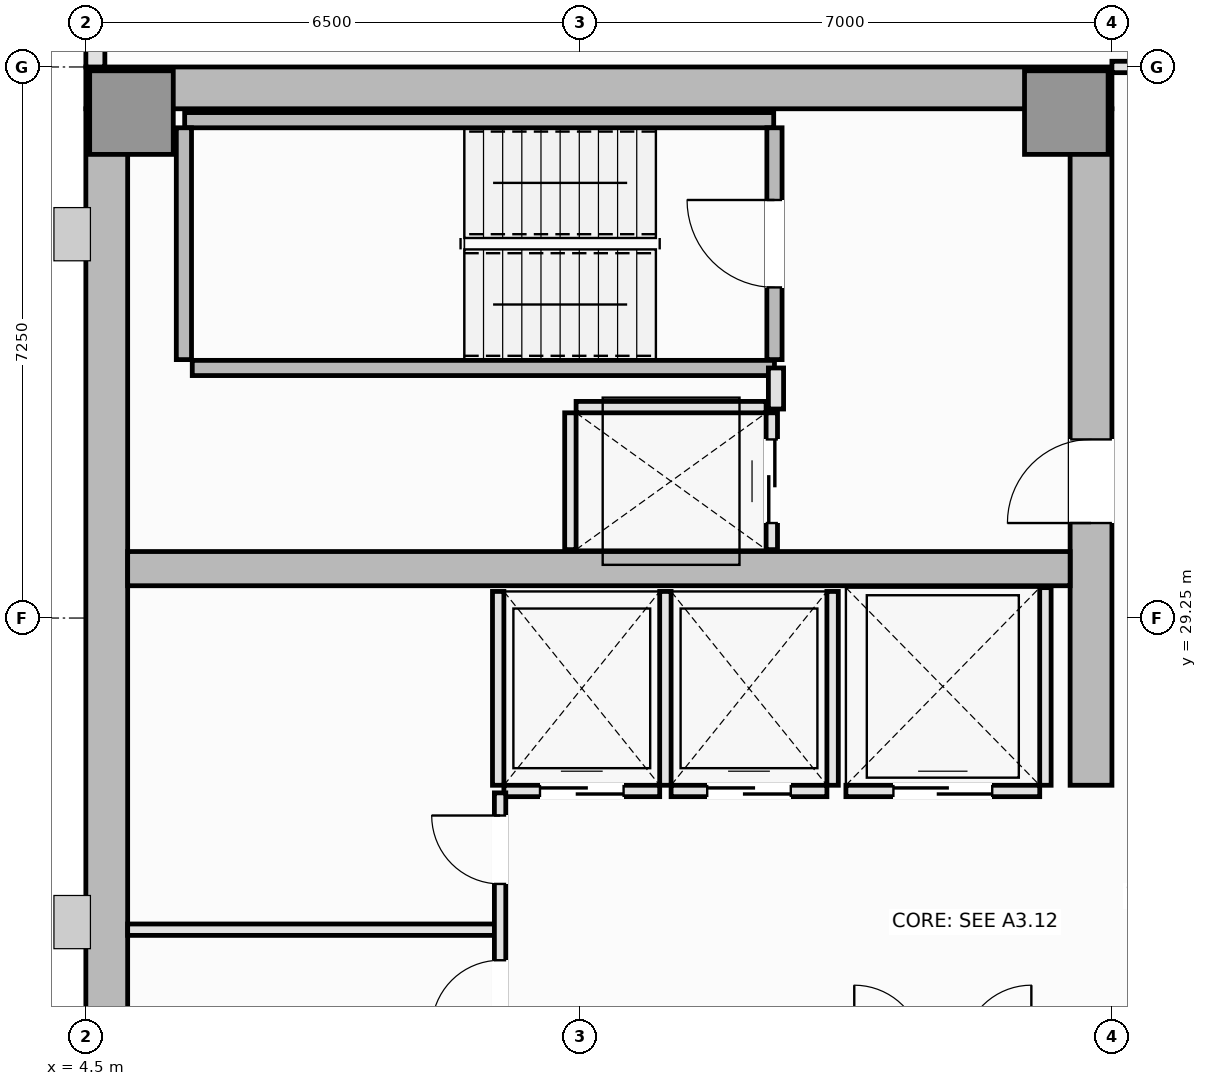
"""IFC4 building model, lengths in metres.
Left out: names, types, materials, properties, quantities, classifications, styles, units other than length and angle.
Written with IfcOpenShell. Run it as: python <this file> out.ifc"""

import sys

from ifc_helpers import new_model, si_unit, direction, frame, frame_2d, origin, origin_2d, place, context, subcontext, project, spatial, rectangle, extrude, element, fill, save


model = new_model("IFC4")
c1 = context("Model", 3, precision=1e-05, world=origin(), true_north=direction((0.0, 1.0)))
c2 = subcontext(c1, "Body", "Model", "MODEL_VIEW")
j1 = project(units=[si_unit("LENGTHUNIT", "METRE"), si_unit("PLANEANGLEUNIT", "RADIAN")], contexts=[c1])
p1 = place(None, origin())
s1 = spatial("IfcSite", under=j1, at=p1, CompositionType="ELEMENT")
p2 = place(p1, origin())
s2 = spatial("IfcBuilding", under=s1, at=p2, CompositionType="ELEMENT")
p3 = place(p2, frame((0.0, 0.0, 202.25)))
s3 = spatial("IfcBuildingStorey", under=s2, at=p3, CompositionType="ELEMENT", Elevation=202.25)
p4 = place(p3, frame((4.5, 36.225, 0.0), z_axis=(0.0, 0.0, 1.0), x_axis=(1.0, 0.0, 0.0)))
e1 = element("IfcWall", 1, at=p4, inside=s3, PredefinedType="SHEAR", context=c2, shape_type="SweptSolid", body=[
    extrude(rectangle(XDim=13.5, YDim=0.55, at=frame_2d((6.75, 0.0))), origin(), (0.0, 0.0, 1.0), 3.55),
])
p5 = place(p3, frame((4.775, 14.55, 0.0), z_axis=(0.0, 0.0, 1.0), x_axis=(0.0, 1.0, 0.0)))
e2 = element("IfcWall", 2, at=p5, inside=s3, PredefinedType="SHEAR", context=c2, shape_type="SweptSolid", body=[
    extrude(rectangle(XDim=21.4, YDim=0.55, at=frame_2d((10.7, 0.0))), origin(), (0.0, 0.0, 1.0), 3.55),
])
p6 = place(p3, frame((17.725, 27.05, 0.0), z_axis=(0.0, 0.0, 1.0), x_axis=(0.0, 1.0, 0.0)))
e3 = element("IfcWall", 3, at=p6, inside=s3, PredefinedType="SHEAR", context=c2, shape_type="SweptSolid", body=[
    extrude(rectangle(XDim=8.9, YDim=0.55, at=frame_2d((4.45, 0.0))), origin(), (0.0, 0.0, 1.0), 3.55),
])
p7 = place(p6, frame((3.45, 0.0, 0.0)))
e4 = element("IfcOpeningElement", 4, at=p7, cuts=e3, PredefinedType="OPENING", context=c2, shape_type="SweptSolid", body=[
    extrude(rectangle(XDim=1.1, YDim=2.15, at=frame_2d((0.55, 1.075))), frame((0.0, 0.285, 0.0), z_axis=(0.0, -1.0, 0.0), x_axis=(1.0, 0.0, 0.0)), (0.0, 0.0, 1.0), 0.57),
])
p8 = place(p3, frame((5.05, 29.9, 0.0), z_axis=(0.0, 0.0, 1.0), x_axis=(1.0, 0.0, 0.0)))
e5 = element("IfcWall", 5, at=p8, inside=s3, PredefinedType="SHEAR", context=c2, shape_type="SweptSolid", body=[
    extrude(rectangle(XDim=12.4, YDim=0.45, at=frame_2d((6.2, 0.0))), origin(), (0.0, 0.0, 1.0), 3.55),
])
for number, where, z_axis, x_axis in (
    (6, (5.1, 35.9, 0.0), (0.0, 0.0, 1.0), (1.0, 0.0, 0.0)),
    (7, (17.4, 35.9, 0.0), (0.0, 0.0, 1.0), (1.0, 0.0, 0.0)),
):
    element("IfcColumn", number, at=place(p3, frame(where, z_axis=z_axis, x_axis=x_axis)), inside=s3, PredefinedType="PILASTER", context=c2, shape_type="SweptSolid", body=[
        extrude(rectangle(XDim=1.1, YDim=1.1, at=origin_2d()), origin(), (0.0, 0.0, 1.0), 3.55),
    ])
p9 = place(p3, frame((4.625, 40.5, 0.0), z_axis=(0.0, 0.0, 1.0), x_axis=(0.0, -1.0, 0.0)))
e8 = element("IfcWall", 8, at=p9, inside=s3, PredefinedType="SOLIDWALL", context=c2, shape_type="SweptSolid", body=[
    extrude(rectangle(XDim=4.0, YDim=0.25, at=frame_2d((2.0, 0.0))), origin(), (0.0, 0.0, 1.0), 3.37),
])
p10 = place(p9, frame((0.9, 0.0, 0.9)))
e9 = element("IfcOpeningElement", 9, at=p10, cuts=e8, PredefinedType="OPENING", context=c2, shape_type="SweptSolid", body=[
    extrude(rectangle(XDim=2.2, YDim=1.8, at=frame_2d((1.1, 0.9))), frame((0.0, 0.135, 0.0), z_axis=(0.0, -1.0, 0.0), x_axis=(1.0, 0.0, 0.0)), (0.0, 0.0, 1.0), 0.27),
])
p11 = place(p3, frame((5.8, 35.8, 0.0), z_axis=(0.0, 0.0, 1.0), x_axis=(1.0, 0.0, 0.0)))
e10 = element("IfcWall", 10, at=p11, inside=s3, PredefinedType="SOLIDWALL", context=c2, shape_type="SweptSolid", body=[
    extrude(rectangle(XDim=7.75, YDim=0.2, at=frame_2d((3.875, 0.0))), origin(), (0.0, 0.0, 1.0), 3.55),
])
p12 = place(p3, frame((5.79, 32.65, 0.0), z_axis=(0.0, 0.0, 1.0), x_axis=(0.0, 1.0, 0.0)))
e11 = element("IfcWall", 11, at=p12, inside=s3, PredefinedType="SOLIDWALL", context=c2, shape_type="SweptSolid", body=[
    extrude(rectangle(XDim=3.05, YDim=0.2, at=frame_2d((1.525, 0.0))), origin(), (0.0, 0.0, 1.0), 3.55),
])
p13 = place(p3, frame((5.9, 32.54, 0.0), z_axis=(0.0, 0.0, 1.0), x_axis=(1.0, 0.0, 0.0)))
e12 = element("IfcWall", 12, at=p13, inside=s3, PredefinedType="SOLIDWALL", context=c2, shape_type="SweptSolid", body=[
    extrude(rectangle(XDim=7.66, YDim=0.2, at=frame_2d((3.83, 0.0))), origin(), (0.0, 0.0, 1.0), 3.55),
])
p14 = place(p3, frame((13.56, 32.65, 0.0), z_axis=(0.0, 0.0, 1.0), x_axis=(0.0, 1.0, 0.0)))
e13 = element("IfcWall", 13, at=p14, inside=s3, PredefinedType="SOLIDWALL", context=c2, shape_type="SweptSolid", body=[
    extrude(rectangle(XDim=3.05, YDim=0.2, at=frame_2d((1.525, 0.0))), origin(), (0.0, 0.0, 1.0), 3.55),
])
p15 = place(p14, frame((0.95, 0.0, 0.0)))
e14 = element("IfcOpeningElement", 14, at=p15, cuts=e13, PredefinedType="OPENING", context=c2, shape_type="SweptSolid", body=[
    extrude(rectangle(XDim=1.15, YDim=2.15, at=frame_2d((0.575, 1.075))), frame((0.0, 0.11, 0.0), z_axis=(0.0, -1.0, 0.0), x_axis=(1.0, 0.0, 0.0)), (0.0, 0.0, 1.0), 0.22),
])
p16 = place(p3, frame((10.0, 26.975, 0.0), z_axis=(0.0, 0.0, 1.0), x_axis=(1.0, 0.0, 0.0)))
e15 = element("IfcWall", 15, at=p16, inside=s3, PredefinedType="PARTITIONING", context=c2, shape_type="SweptSolid", body=[
    extrude(rectangle(XDim=2.05, YDim=0.15, at=frame_2d((1.025, 0.0))), origin(), (0.0, 0.0, 1.0), 3.37),
])
p17 = place(p16, frame((0.475, 0.0, 0.0)))
e16 = element("IfcOpeningElement", 16, at=p17, cuts=e15, PredefinedType="OPENING", context=c2, shape_type="SweptSolid", body=[
    extrude(rectangle(XDim=1.1, YDim=2.2, at=frame_2d((0.55, 1.1))), frame((0.0, 0.085, 0.0), z_axis=(0.0, -1.0, 0.0), x_axis=(1.0, 0.0, 0.0)), (0.0, 0.0, 1.0), 0.17),
])
for number, where, z_axis, x_axis in (
    (17, (9.925, 27.05, 0.0), (0.0, 0.0, 1.0), (0.0, 1.0, 0.0)),
    (18, (12.125, 27.05, 0.0), (0.0, 0.0, 1.0), (0.0, 1.0, 0.0)),
):
    element("IfcWall", number, at=place(p3, frame(where, z_axis=z_axis, x_axis=x_axis)), inside=s3, PredefinedType="PARTITIONING", context=c2, shape_type="SweptSolid", body=[
        extrude(rectangle(XDim=2.55, YDim=0.15, at=frame_2d((1.275, 0.0))), origin(), (0.0, 0.0, 1.0), 3.37),
    ])
p18 = place(p3, frame((12.2, 26.975, 0.0), z_axis=(0.0, 0.0, 1.0), x_axis=(1.0, 0.0, 0.0)))
e19 = element("IfcWall", 19, at=p18, inside=s3, PredefinedType="PARTITIONING", context=c2, shape_type="SweptSolid", body=[
    extrude(rectangle(XDim=2.05, YDim=0.15, at=frame_2d((1.025, 0.0))), origin(), (0.0, 0.0, 1.0), 3.37),
])
p19 = place(p18, frame((0.475, 0.0, 0.0)))
e20 = element("IfcOpeningElement", 20, at=p19, cuts=e19, PredefinedType="OPENING", context=c2, shape_type="SweptSolid", body=[
    extrude(rectangle(XDim=1.1, YDim=2.2, at=frame_2d((0.55, 1.1))), frame((0.0, 0.085, 0.0), z_axis=(0.0, -1.0, 0.0), x_axis=(1.0, 0.0, 0.0)), (0.0, 0.0, 1.0), 0.17),
])
p20 = place(p3, frame((14.325, 27.05, 0.0), z_axis=(0.0, 0.0, 1.0), x_axis=(0.0, 1.0, 0.0)))
e21 = element("IfcWall", 21, at=p20, inside=s3, PredefinedType="PARTITIONING", context=c2, shape_type="SweptSolid", body=[
    extrude(rectangle(XDim=2.55, YDim=0.15, at=frame_2d((1.275, 0.0))), origin(), (0.0, 0.0, 1.0), 3.37),
])
p21 = place(p3, frame((14.5, 26.975, 0.0), z_axis=(0.0, 0.0, 1.0), x_axis=(1.0, 0.0, 0.0)))
e22 = element("IfcWall", 22, at=p21, inside=s3, PredefinedType="PARTITIONING", context=c2, shape_type="SweptSolid", body=[
    extrude(rectangle(XDim=2.55, YDim=0.15, at=frame_2d((1.275, 0.0))), origin(), (0.0, 0.0, 1.0), 3.37),
])
p22 = place(p21, frame((0.625, 0.0, 0.0)))
e23 = element("IfcOpeningElement", 23, at=p22, cuts=e22, PredefinedType="OPENING", context=c2, shape_type="SweptSolid", body=[
    extrude(rectangle(XDim=1.3, YDim=2.2, at=frame_2d((0.65, 1.1))), frame((0.0, 0.085, 0.0), z_axis=(0.0, -1.0, 0.0), x_axis=(1.0, 0.0, 0.0)), (0.0, 0.0, 1.0), 0.17),
])
p23 = place(p3, frame((17.125, 27.05, 0.0), z_axis=(0.0, 0.0, 1.0), x_axis=(0.0, 1.0, 0.0)))
e24 = element("IfcWall", 24, at=p23, inside=s3, PredefinedType="PARTITIONING", context=c2, shape_type="SweptSolid", body=[
    extrude(rectangle(XDim=2.6, YDim=0.15, at=frame_2d((1.3, 0.0))), origin(), (0.0, 0.0, 1.0), 3.37),
])
p24 = place(p3, frame((10.95, 32.025, 0.0), z_axis=(0.0, 0.0, 1.0), x_axis=(1.0, 0.0, 0.0)))
e25 = element("IfcWall", 25, at=p24, inside=s3, PredefinedType="PARTITIONING", context=c2, shape_type="SweptSolid", body=[
    extrude(rectangle(XDim=2.5, YDim=0.15, at=frame_2d((1.25, 0.0))), origin(), (0.0, 0.0, 1.0), 3.37),
])
p25 = place(p3, frame((10.875, 30.15, 0.0), z_axis=(0.0, 0.0, 1.0), x_axis=(0.0, 1.0, 0.0)))
e26 = element("IfcWall", 26, at=p25, inside=s3, PredefinedType="PARTITIONING", context=c2, shape_type="SweptSolid", body=[
    extrude(rectangle(XDim=1.8, YDim=0.15, at=frame_2d((0.9, 0.0))), origin(), (0.0, 0.0, 1.0), 3.37),
])
p26 = place(p3, frame((13.525, 30.15, 0.0), z_axis=(0.0, 0.0, 1.0), x_axis=(0.0, 1.0, 0.0)))
e27 = element("IfcWall", 27, at=p26, inside=s3, PredefinedType="PARTITIONING", context=c2, shape_type="SweptSolid", body=[
    extrude(rectangle(XDim=1.8, YDim=0.15, at=frame_2d((0.9, 0.0))), origin(), (0.0, 0.0, 1.0), 3.37),
])
p27 = place(p26, frame((0.35, 0.0, 0.0)))
e28 = element("IfcOpeningElement", 28, at=p27, cuts=e27, PredefinedType="OPENING", context=c2, shape_type="SweptSolid", body=[
    extrude(rectangle(XDim=1.1, YDim=2.2, at=frame_2d((0.55, 1.1))), frame((0.0, 0.085, 0.0), z_axis=(0.0, -1.0, 0.0), x_axis=(1.0, 0.0, 0.0)), (0.0, 0.0, 1.0), 0.17),
])
p28 = place(p3, frame((13.58, 32.0, 0.0), z_axis=(0.0, 0.0, 1.0), x_axis=(0.0, 1.0, 0.0)))
e29 = element("IfcWall", 29, at=p28, inside=s3, PredefinedType="PARTITIONING", context=c2, shape_type="SweptSolid", body=[
    extrude(rectangle(XDim=0.54, YDim=0.2, at=frame_2d((0.27, 0.0))), origin(), (0.0, 0.0, 1.0), 3.37),
])
p29 = place(p3, frame((5.05, 25.15, 0.0), z_axis=(0.0, 0.0, 1.0), x_axis=(1.0, 0.0, 0.0)))
e30 = element("IfcWall", 30, at=p29, inside=s3, PredefinedType="PARTITIONING", context=c2, shape_type="SweptSolid", body=[
    extrude(rectangle(XDim=4.9, YDim=0.15, at=frame_2d((2.45, 0.0))), origin(), (0.0, 0.0, 1.0), 3.37),
])
p30 = place(p3, frame((9.95, 23.55, 0.0), z_axis=(0.0, 0.0, 1.0), x_axis=(0.0, 1.0, 0.0)))
e31 = element("IfcWall", 31, at=p30, inside=s3, PredefinedType="PARTITIONING", context=c2, shape_type="SweptSolid", body=[
    extrude(rectangle(XDim=3.4, YDim=0.15, at=frame_2d((1.7, 0.0))), origin(), (0.0, 0.0, 1.0), 3.37),
])
p31 = place(p30, frame((0.298, 0.0, 0.0)))
e32 = element("IfcOpeningElement", 32, at=p31, cuts=e31, PredefinedType="OPENING", context=c2, shape_type="SweptSolid", body=[
    extrude(rectangle(XDim=0.9, YDim=2.1, at=frame_2d((0.45, 1.05))), frame((0.0, 0.085, 0.0), z_axis=(0.0, -1.0, 0.0), x_axis=(1.0, 0.0, 0.0)), (0.0, 0.0, 1.0), 0.17),
])
p32 = place(p30, frame((2.202, 0.0, 0.0)))
e33 = element("IfcOpeningElement", 33, at=p32, cuts=e31, PredefinedType="OPENING", context=c2, shape_type="SweptSolid", body=[
    extrude(rectangle(XDim=0.9, YDim=2.1, at=frame_2d((0.45, 1.05))), frame((0.0, 0.085, 0.0), z_axis=(0.0, -1.0, 0.0), x_axis=(1.0, 0.0, 0.0)), (0.0, 0.0, 1.0), 0.17),
])
p33 = place(p3, frame((18.0, 36.5, 0.0), z_axis=(0.0, 0.0, 1.0), x_axis=(1.0, 0.0, 0.0)))
e34 = element("IfcWall", 34, at=p33, inside=s3, PredefinedType="PARTITIONING", context=c2, shape_type="SweptSolid", body=[
    extrude(rectangle(XDim=1.9, YDim=0.15, at=frame_2d((0.95, 0.0))), origin(), (0.0, 0.0, 1.0), 3.37),
])
p34 = place(p33, frame((0.5, 0.0, 0.0)))
e35 = element("IfcOpeningElement", 35, at=p34, cuts=e34, PredefinedType="OPENING", context=c2, shape_type="SweptSolid", body=[
    extrude(rectangle(XDim=0.9, YDim=2.1, at=frame_2d((0.45, 1.05))), frame((0.0, 0.085, 0.0), z_axis=(0.0, -1.0, 0.0), x_axis=(1.0, 0.0, 0.0)), (0.0, 0.0, 1.0), 0.17),
])
p35 = place(p15, origin())
e36 = element("IfcDoor", 36, at=p35, inside=s3, OperationType="SINGLE_SWING_RIGHT", PredefinedType="DOOR", context=c2, shape_type="SweptSolid", body=[
    extrude(rectangle(XDim=1.15, YDim=2.15, at=frame_2d((0.575, 1.075))), frame((0.0, 0.025, 0.0), z_axis=(0.0, -1.0, 0.0), x_axis=(1.0, 0.0, 0.0)), (0.0, 0.0, 1.0), 0.05),
])
fill(e14, e36)
p36 = place(p17, origin())
e37 = element("IfcDoor", 37, at=p36, inside=s3, OperationType="DOUBLE_DOOR_SLIDING", PredefinedType="DOOR", context=c2, shape_type="SweptSolid", body=[
    extrude(rectangle(XDim=1.1, YDim=2.2, at=frame_2d((0.55, 1.1))), frame((0.0, 0.025, 0.0), z_axis=(0.0, -1.0, 0.0), x_axis=(1.0, 0.0, 0.0)), (0.0, 0.0, 1.0), 0.05),
])
fill(e16, e37)
p37 = place(p19, origin())
e38 = element("IfcDoor", 38, at=p37, inside=s3, OperationType="DOUBLE_DOOR_SLIDING", PredefinedType="DOOR", context=c2, shape_type="SweptSolid", body=[
    extrude(rectangle(XDim=1.1, YDim=2.2, at=frame_2d((0.55, 1.1))), frame((0.0, 0.025, 0.0), z_axis=(0.0, -1.0, 0.0), x_axis=(1.0, 0.0, 0.0)), (0.0, 0.0, 1.0), 0.05),
])
fill(e20, e38)
p38 = place(p22, origin())
e39 = element("IfcDoor", 39, at=p38, inside=s3, OperationType="DOUBLE_DOOR_SLIDING", PredefinedType="DOOR", context=c2, shape_type="SweptSolid", body=[
    extrude(rectangle(XDim=1.3, YDim=2.2, at=frame_2d((0.65, 1.1))), frame((0.0, 0.025, 0.0), z_axis=(0.0, -1.0, 0.0), x_axis=(1.0, 0.0, 0.0)), (0.0, 0.0, 1.0), 0.05),
])
fill(e23, e39)
p39 = place(p27, origin())
e40 = element("IfcDoor", 40, at=p39, inside=s3, OperationType="DOUBLE_DOOR_SLIDING", PredefinedType="DOOR", context=c2, shape_type="SweptSolid", body=[
    extrude(rectangle(XDim=1.1, YDim=2.2, at=frame_2d((0.55, 1.1))), frame((0.0, 0.025, 0.0), z_axis=(0.0, -1.0, 0.0), x_axis=(1.0, 0.0, 0.0)), (0.0, 0.0, 1.0), 0.05),
])
fill(e28, e40)
p40 = place(p7, origin())
e41 = element("IfcDoor", 41, at=p40, inside=s3, OperationType="SINGLE_SWING_LEFT", PredefinedType="DOOR", context=c2, shape_type="SweptSolid", body=[
    extrude(rectangle(XDim=1.1, YDim=2.15, at=frame_2d((0.55, 1.075))), frame((0.0, 0.025, 0.0), z_axis=(0.0, -1.0, 0.0), x_axis=(1.0, 0.0, 0.0)), (0.0, 0.0, 1.0), 0.05),
])
fill(e4, e41)
p41 = place(p31, origin())
e42 = element("IfcDoor", 42, at=p41, inside=s3, OperationType="SINGLE_SWING_LEFT", PredefinedType="DOOR", context=c2, shape_type="SweptSolid", body=[
    extrude(rectangle(XDim=0.9, YDim=2.1, at=frame_2d((0.45, 1.05))), frame((0.0, 0.025, 0.0), z_axis=(0.0, -1.0, 0.0), x_axis=(1.0, 0.0, 0.0)), (0.0, 0.0, 1.0), 0.05),
])
fill(e32, e42)
p42 = place(p32, origin())
e43 = element("IfcDoor", 43, at=p42, inside=s3, OperationType="SINGLE_SWING_RIGHT", PredefinedType="DOOR", context=c2, shape_type="SweptSolid", body=[
    extrude(rectangle(XDim=0.9, YDim=2.1, at=frame_2d((0.45, 1.05))), frame((0.0, 0.025, 0.0), z_axis=(0.0, -1.0, 0.0), x_axis=(1.0, 0.0, 0.0)), (0.0, 0.0, 1.0), 0.05),
])
fill(e33, e43)
save(model, sys.argv[1])
